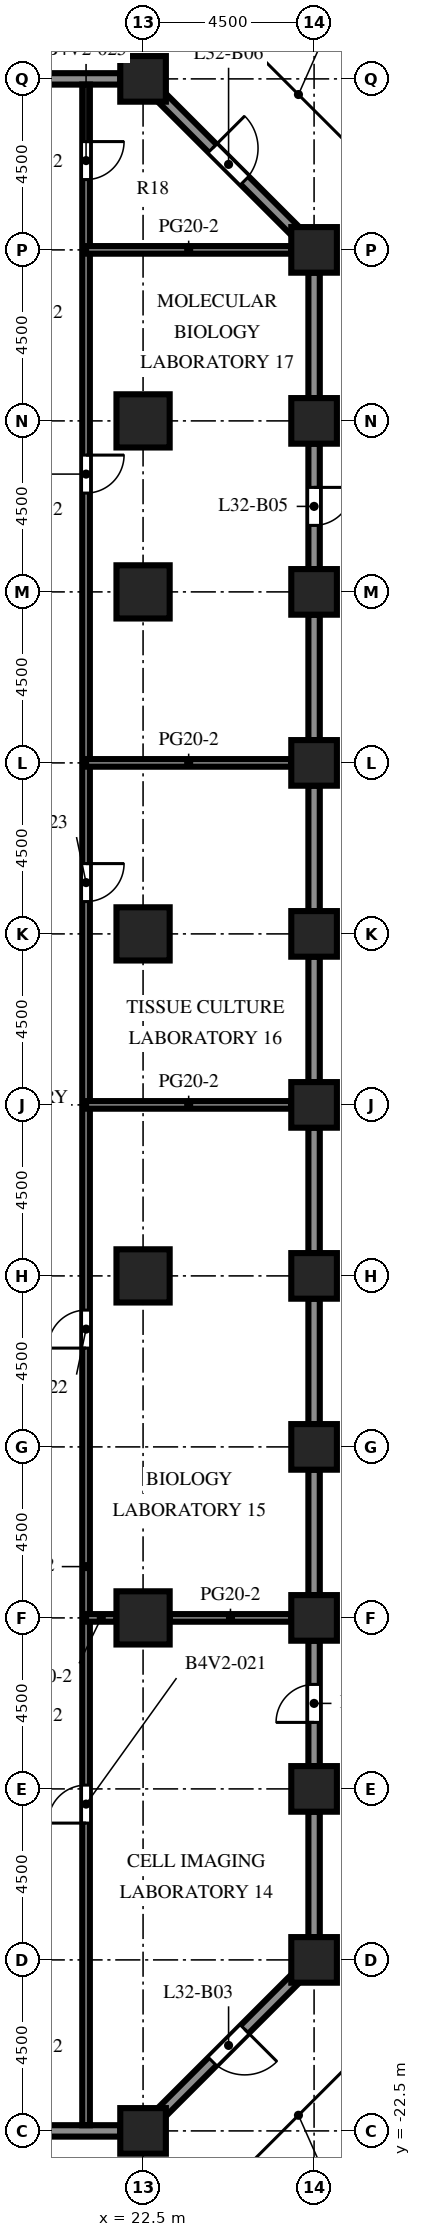
"""IFC4 building model, lengths in metres.
Left out: names, types, materials, properties, quantities, classifications, styles, units other than length and angle.
Written with IfcOpenShell. Run it as: python <this file> out.ifc"""

import sys

from ifc_helpers import new_model, si_unit, direction, frame, frame_2d, origin, origin_2d, place, context, subcontext, project, spatial, rectangle, extrude, element, fill, save


model = new_model("IFC4")
c1 = context("Model", 3, precision=1e-05, world=origin(), true_north=direction((0.0, 1.0)))
c2 = subcontext(c1, "Body", "Model", "MODEL_VIEW")
j1 = project(units=[si_unit("LENGTHUNIT", "METRE"), si_unit("PLANEANGLEUNIT", "RADIAN")], contexts=[c1])
p1 = place(None, origin())
s1 = spatial("IfcSite", under=j1, at=p1, CompositionType="ELEMENT")
p2 = place(p1, origin())
s2 = spatial("IfcBuilding", under=s1, at=p2, CompositionType="ELEMENT")
p3 = place(p2, frame((0.0, 0.0, 141.3)))
s3 = spatial("IfcBuildingStorey", under=s2, at=p3, CompositionType="ELEMENT", Elevation=141.3)
for number, where, z_axis, x_axis in (
    (1, (22.5, -22.5, 0.0), (0.0, 0.0, 1.0), (1.0, 0.0, 0.0)),
    (2, (22.5, 31.5, 0.0), (0.0, 0.0, 1.0), (1.0, 0.0, 0.0)),
    (3, (27.0, -18.0, 0.0), (0.0, 0.0, 1.0), (1.0, 0.0, 0.0)),
    (4, (27.0, -13.5, 0.0), (0.0, 0.0, 1.0), (1.0, 0.0, 0.0)),
    (5, (27.0, -9.0, 0.0), (0.0, 0.0, 1.0), (1.0, 0.0, 0.0)),
    (6, (27.0, -4.5, 0.0), (0.0, 0.0, 1.0), (1.0, 0.0, 0.0)),
    (7, (27.0, 0.0, 0.0), (0.0, 0.0, 1.0), (1.0, 0.0, 0.0)),
    (8, (27.0, 4.5, 0.0), (0.0, 0.0, 1.0), (1.0, 0.0, 0.0)),
    (9, (27.0, 9.0, 0.0), (0.0, 0.0, 1.0), (1.0, 0.0, 0.0)),
    (10, (27.0, 13.5, 0.0), (0.0, 0.0, 1.0), (1.0, 0.0, 0.0)),
    (11, (27.0, 18.0, 0.0), (0.0, 0.0, 1.0), (1.0, 0.0, 0.0)),
    (12, (27.0, 22.5, 0.0), (0.0, 0.0, 1.0), (1.0, 0.0, 0.0)),
    (13, (27.0, 27.0, 0.0), (0.0, 0.0, 1.0), (1.0, 0.0, 0.0)),
):
    element("IfcColumn", number, at=place(p3, frame(where, z_axis=z_axis, x_axis=x_axis)), inside=s3, PredefinedType="COLUMN", context=c2, shape_type="SweptSolid", body=[
        extrude(rectangle(XDim=1.2, YDim=1.2, at=origin_2d()), origin(), (0.0, 0.0, 1.0), 4.1),
    ])
for number, where, z_axis, x_axis in (
    (14, (22.5, -9.0, 0.0), (0.0, 0.0, 1.0), (1.0, 0.0, 0.0)),
    (15, (22.5, 0.0, 0.0), (0.0, 0.0, 1.0), (1.0, 0.0, 0.0)),
    (16, (22.5, 9.0, 0.0), (0.0, 0.0, 1.0), (1.0, 0.0, 0.0)),
    (17, (22.5, 18.0, 0.0), (0.0, 0.0, 1.0), (1.0, 0.0, 0.0)),
    (18, (22.5, 22.5, 0.0), (0.0, 0.0, 1.0), (1.0, 0.0, 0.0)),
):
    element("IfcColumn", number, at=place(p3, frame(where, z_axis=z_axis, x_axis=x_axis)), inside=s3, PredefinedType="COLUMN", context=c2, shape_type="SweptSolid", body=[
        extrude(rectangle(XDim=1.4, YDim=1.4, at=origin_2d()), origin(), (0.0, 0.0, 1.0), 4.1),
    ])
p4 = place(p3, frame((21.9, -22.5, 0.0), z_axis=(0.0, 0.0, 1.0), x_axis=(-1.0, 0.0, 0.0)))
e19 = element("IfcWall", 19, at=p4, inside=s3, PredefinedType="SOLIDWALL", context=c2, shape_type="SweptSolid", body=[
    extrude(rectangle(XDim=3.3, YDim=0.3, at=frame_2d((1.65, 0.0))), origin(), (0.0, 0.0, 1.0), 2.6),
])
p5 = place(p3, frame((26.506, -18.494, 0.0), z_axis=(0.0, 0.0, 1.0), x_axis=(-0.707106781187, -0.707106781187, 0.0)))
e20 = element("IfcWall", 20, at=p5, inside=s3, PredefinedType="SOLIDWALL", context=c2, shape_type="SweptSolid", body=[
    extrude(rectangle(XDim=4.967, YDim=0.3, at=frame_2d((2.483, 0.0))), origin(), (0.0, 0.0, 1.0), 2.6),
])
p6 = place(p5, frame((1.884, 0.0, 0.0)))
e21 = element("IfcOpeningElement", 21, at=p6, cuts=e20, PredefinedType="OPENING", context=c2, shape_type="SweptSolid", body=[
    extrude(rectangle(XDim=1.2, YDim=2.2, at=frame_2d((0.6, 1.1))), frame((0.0, 0.16, 0.0), z_axis=(0.0, -1.0, 0.0), x_axis=(1.0, 0.0, 0.0)), (0.0, 0.0, 1.0), 0.32),
])
p7 = place(p3, frame((27.0, -14.1, 0.0), z_axis=(0.0, 0.0, 1.0), x_axis=(0.0, -1.0, 0.0)))
e22 = element("IfcWall", 22, at=p7, inside=s3, PredefinedType="SOLIDWALL", context=c2, shape_type="SweptSolid", body=[
    extrude(rectangle(XDim=3.3, YDim=0.3, at=frame_2d((1.65, 0.0))), origin(), (0.0, 0.0, 1.0), 2.6),
])
p8 = place(p3, frame((27.0, -9.6, 0.0), z_axis=(0.0, 0.0, 1.0), x_axis=(0.0, -1.0, 0.0)))
e23 = element("IfcWall", 23, at=p8, inside=s3, PredefinedType="SOLIDWALL", context=c2, shape_type="SweptSolid", body=[
    extrude(rectangle(XDim=3.3, YDim=0.3, at=frame_2d((1.65, 0.0))), origin(), (0.0, 0.0, 1.0), 2.6),
])
p9 = place(p8, frame((1.15, 0.0, 0.0)))
e24 = element("IfcOpeningElement", 24, at=p9, cuts=e23, PredefinedType="OPENING", context=c2, shape_type="SweptSolid", body=[
    extrude(rectangle(XDim=1.0, YDim=2.2, at=frame_2d((0.5, 1.1))), frame((0.0, 0.16, 0.0), z_axis=(0.0, -1.0, 0.0), x_axis=(1.0, 0.0, 0.0)), (0.0, 0.0, 1.0), 0.32),
])
for number, where, z_axis, x_axis in (
    (25, (27.0, -5.1, 0.0), (0.0, 0.0, 1.0), (0.0, -1.0, 0.0)),
    (26, (27.0, -0.6, 0.0), (0.0, 0.0, 1.0), (0.0, -1.0, 0.0)),
    (27, (27.0, 3.9, 0.0), (0.0, 0.0, 1.0), (0.0, -1.0, 0.0)),
    (28, (27.0, 8.4, 0.0), (0.0, 0.0, 1.0), (0.0, -1.0, 0.0)),
    (29, (27.0, 12.9, 0.0), (0.0, 0.0, 1.0), (0.0, -1.0, 0.0)),
    (30, (27.0, 17.4, 0.0), (0.0, 0.0, 1.0), (0.0, -1.0, 0.0)),
):
    element("IfcWall", number, at=place(p3, frame(where, z_axis=z_axis, x_axis=x_axis)), inside=s3, PredefinedType="SOLIDWALL", context=c2, shape_type="SweptSolid", body=[
        extrude(rectangle(XDim=3.3, YDim=0.3, at=frame_2d((1.65, 0.0))), origin(), (0.0, 0.0, 1.0), 2.6),
    ])
p10 = place(p3, frame((27.0, 21.9, 0.0), z_axis=(0.0, 0.0, 1.0), x_axis=(0.0, -1.0, 0.0)))
e31 = element("IfcWall", 31, at=p10, inside=s3, PredefinedType="SOLIDWALL", context=c2, shape_type="SweptSolid", body=[
    extrude(rectangle(XDim=3.3, YDim=0.3, at=frame_2d((1.65, 0.0))), origin(), (0.0, 0.0, 1.0), 2.6),
])
p11 = place(p10, frame((1.15, 0.0, 0.0)))
e32 = element("IfcOpeningElement", 32, at=p11, cuts=e31, PredefinedType="OPENING", context=c2, shape_type="SweptSolid", body=[
    extrude(rectangle(XDim=1.0, YDim=2.2, at=frame_2d((0.5, 1.1))), frame((0.0, 0.16, 0.0), z_axis=(0.0, -1.0, 0.0), x_axis=(1.0, 0.0, 0.0)), (0.0, 0.0, 1.0), 0.32),
])
p12 = place(p3, frame((27.0, 26.4, 0.0), z_axis=(0.0, 0.0, 1.0), x_axis=(0.0, -1.0, 0.0)))
e33 = element("IfcWall", 33, at=p12, inside=s3, PredefinedType="SOLIDWALL", context=c2, shape_type="SweptSolid", body=[
    extrude(rectangle(XDim=3.3, YDim=0.3, at=frame_2d((1.65, 0.0))), origin(), (0.0, 0.0, 1.0), 2.6),
])
p13 = place(p3, frame((22.994, 31.006, 0.0), z_axis=(0.0, 0.0, 1.0), x_axis=(0.707106781187, -0.707106781187, 0.0)))
e34 = element("IfcWall", 34, at=p13, inside=s3, PredefinedType="SOLIDWALL", context=c2, shape_type="SweptSolid", body=[
    extrude(rectangle(XDim=4.967, YDim=0.3, at=frame_2d((2.483, 0.0))), origin(), (0.0, 0.0, 1.0), 2.6),
])
p14 = place(p13, frame((1.884, 0.0, 0.0)))
e35 = element("IfcOpeningElement", 35, at=p14, cuts=e34, PredefinedType="OPENING", context=c2, shape_type="SweptSolid", body=[
    extrude(rectangle(XDim=1.2, YDim=2.2, at=frame_2d((0.6, 1.1))), frame((0.0, 0.16, 0.0), z_axis=(0.0, -1.0, 0.0), x_axis=(1.0, 0.0, 0.0)), (0.0, 0.0, 1.0), 0.32),
])
p15 = place(p3, frame((18.6, 31.5, 0.0), z_axis=(0.0, 0.0, 1.0), x_axis=(1.0, 0.0, 0.0)))
e36 = element("IfcWall", 36, at=p15, inside=s3, PredefinedType="SOLIDWALL", context=c2, shape_type="SweptSolid", body=[
    extrude(rectangle(XDim=3.3, YDim=0.3, at=frame_2d((1.65, 0.0))), origin(), (0.0, 0.0, 1.0), 2.6),
])
p16 = place(p3, frame((21.0, 31.35, 0.0), z_axis=(0.0, 0.0, 1.0), x_axis=(0.0, -1.0, 0.0)))
e37 = element("IfcWall", 37, at=p16, inside=s3, PredefinedType="PARTITIONING", context=c2, shape_type="SweptSolid", body=[
    extrude(rectangle(XDim=53.7, YDim=0.2, at=frame_2d((26.85, 0.0))), origin(), (0.0, 0.0, 1.0), 3.5),
])
p17 = place(p16, frame((44.75, 0.0, 0.0)))
e38 = element("IfcOpeningElement", 38, at=p17, cuts=e37, PredefinedType="OPENING", context=c2, shape_type="SweptSolid", body=[
    extrude(rectangle(XDim=1.0, YDim=2.1, at=frame_2d((0.5, 1.05))), frame((0.0, 0.11, 0.0), z_axis=(0.0, -1.0, 0.0), x_axis=(1.0, 0.0, 0.0)), (0.0, 0.0, 1.0), 0.22),
])
p18 = place(p16, frame((32.25, 0.0, 0.0)))
e39 = element("IfcOpeningElement", 39, at=p18, cuts=e37, PredefinedType="OPENING", context=c2, shape_type="SweptSolid", body=[
    extrude(rectangle(XDim=1.0, YDim=2.1, at=frame_2d((0.5, 1.05))), frame((0.0, 0.11, 0.0), z_axis=(0.0, -1.0, 0.0), x_axis=(1.0, 0.0, 0.0)), (0.0, 0.0, 1.0), 0.22),
])
p19 = place(p16, frame((20.5, 0.0, 0.0)))
e40 = element("IfcOpeningElement", 40, at=p19, cuts=e37, PredefinedType="OPENING", context=c2, shape_type="SweptSolid", body=[
    extrude(rectangle(XDim=1.0, YDim=2.1, at=frame_2d((0.5, 1.05))), frame((0.0, 0.11, 0.0), z_axis=(0.0, -1.0, 0.0), x_axis=(1.0, 0.0, 0.0)), (0.0, 0.0, 1.0), 0.22),
])
p20 = place(p16, frame((9.75, 0.0, 0.0)))
e41 = element("IfcOpeningElement", 41, at=p20, cuts=e37, PredefinedType="OPENING", context=c2, shape_type="SweptSolid", body=[
    extrude(rectangle(XDim=1.0, YDim=2.1, at=frame_2d((0.5, 1.05))), frame((0.0, 0.11, 0.0), z_axis=(0.0, -1.0, 0.0), x_axis=(1.0, 0.0, 0.0)), (0.0, 0.0, 1.0), 0.22),
])
p21 = place(p16, frame((1.5, 0.0, 0.0)))
e42 = element("IfcOpeningElement", 42, at=p21, cuts=e37, PredefinedType="OPENING", context=c2, shape_type="SweptSolid", body=[
    extrude(rectangle(XDim=1.0, YDim=2.1, at=frame_2d((0.5, 1.05))), frame((0.0, 0.11, 0.0), z_axis=(0.0, -1.0, 0.0), x_axis=(1.0, 0.0, 0.0)), (0.0, 0.0, 1.0), 0.22),
])
p22 = place(p3, frame((21.0, -9.0, 0.0), z_axis=(0.0, 0.0, 1.0), x_axis=(1.0, 0.0, 0.0)))
e43 = element("IfcWall", 43, at=p22, inside=s3, PredefinedType="PARTITIONING", context=c2, shape_type="SweptSolid", body=[
    extrude(rectangle(XDim=0.8, YDim=0.2, at=frame_2d((0.4, 0.0))), origin(), (0.0, 0.0, 1.0), 3.5),
])
p23 = place(p3, frame((23.2, -9.0, 0.0), z_axis=(0.0, 0.0, 1.0), x_axis=(1.0, 0.0, 0.0)))
e44 = element("IfcWall", 44, at=p23, inside=s3, PredefinedType="PARTITIONING", context=c2, shape_type="SweptSolid", body=[
    extrude(rectangle(XDim=3.2, YDim=0.2, at=frame_2d((1.6, 0.0))), origin(), (0.0, 0.0, 1.0), 3.5),
])
for number, where, z_axis, x_axis in (
    (45, (21.0, 4.5, 0.0), (0.0, 0.0, 1.0), (1.0, 0.0, 0.0)),
    (46, (21.0, 13.5, 0.0), (0.0, 0.0, 1.0), (1.0, 0.0, 0.0)),
    (47, (21.0, 27.0, 0.0), (0.0, 0.0, 1.0), (1.0, 0.0, 0.0)),
):
    element("IfcWall", number, at=place(p3, frame(where, z_axis=z_axis, x_axis=x_axis)), inside=s3, PredefinedType="PARTITIONING", context=c2, shape_type="SweptSolid", body=[
        extrude(rectangle(XDim=5.4, YDim=0.2, at=frame_2d((2.7, 0.0))), origin(), (0.0, 0.0, 1.0), 3.5),
    ])
p24 = place(p6, origin())
e48 = element("IfcDoor", 48, at=p24, inside=s3, OperationType="SINGLE_SWING_LEFT", PredefinedType="DOOR", context=c2, shape_type="SweptSolid", body=[
    extrude(rectangle(XDim=1.2, YDim=2.2, at=frame_2d((0.6, 1.1))), frame((0.0, 0.025, 0.0), z_axis=(0.0, -1.0, 0.0), x_axis=(1.0, 0.0, 0.0)), (0.0, 0.0, 1.0), 0.05),
])
fill(e21, e48)
p25 = place(p9, origin())
e49 = element("IfcDoor", 49, at=p25, inside=s3, OperationType="SINGLE_SWING_RIGHT", PredefinedType="DOOR", context=c2, shape_type="SweptSolid", body=[
    extrude(rectangle(XDim=1.0, YDim=2.2, at=frame_2d((0.5, 1.1))), frame((0.0, 0.025, 0.0), z_axis=(0.0, -1.0, 0.0), x_axis=(1.0, 0.0, 0.0)), (0.0, 0.0, 1.0), 0.05),
])
fill(e24, e49)
p26 = place(p11, origin())
e50 = element("IfcDoor", 50, at=p26, inside=s3, OperationType="SINGLE_SWING_LEFT", PredefinedType="DOOR", context=c2, shape_type="SweptSolid", body=[
    extrude(rectangle(XDim=1.0, YDim=2.2, at=frame_2d((0.5, 1.1))), frame((0.0, 0.025, 0.0), z_axis=(0.0, -1.0, 0.0), x_axis=(1.0, 0.0, 0.0)), (0.0, 0.0, 1.0), 0.05),
])
fill(e32, e50)
p27 = place(p14, origin())
e51 = element("IfcDoor", 51, at=p27, inside=s3, OperationType="SINGLE_SWING_LEFT", PredefinedType="DOOR", context=c2, shape_type="SweptSolid", body=[
    extrude(rectangle(XDim=1.2, YDim=2.2, at=frame_2d((0.6, 1.1))), frame((0.0, 0.025, 0.0), z_axis=(0.0, -1.0, 0.0), x_axis=(1.0, 0.0, 0.0)), (0.0, 0.0, 1.0), 0.05),
])
fill(e35, e51)
p28 = place(p17, origin())
e52 = element("IfcDoor", 52, at=p28, inside=s3, OperationType="SINGLE_SWING_RIGHT", PredefinedType="DOOR", context=c2, shape_type="SweptSolid", body=[
    extrude(rectangle(XDim=1.0, YDim=2.1, at=frame_2d((0.5, 1.05))), frame((0.0, 0.025, 0.0), z_axis=(0.0, -1.0, 0.0), x_axis=(1.0, 0.0, 0.0)), (0.0, 0.0, 1.0), 0.05),
])
fill(e38, e52)
p29 = place(p18, origin())
e53 = element("IfcDoor", 53, at=p29, inside=s3, OperationType="SINGLE_SWING_RIGHT", PredefinedType="DOOR", context=c2, shape_type="SweptSolid", body=[
    extrude(rectangle(XDim=1.0, YDim=2.1, at=frame_2d((0.5, 1.05))), frame((0.0, 0.025, 0.0), z_axis=(0.0, -1.0, 0.0), x_axis=(1.0, 0.0, 0.0)), (0.0, 0.0, 1.0), 0.05),
])
fill(e39, e53)
p30 = place(p19, origin())
e54 = element("IfcDoor", 54, at=p30, inside=s3, OperationType="SINGLE_SWING_LEFT", PredefinedType="DOOR", context=c2, shape_type="SweptSolid", body=[
    extrude(rectangle(XDim=1.0, YDim=2.1, at=frame_2d((0.5, 1.05))), frame((0.0, 0.025, 0.0), z_axis=(0.0, -1.0, 0.0), x_axis=(1.0, 0.0, 0.0)), (0.0, 0.0, 1.0), 0.05),
])
fill(e40, e54)
p31 = place(p20, origin())
e55 = element("IfcDoor", 55, at=p31, inside=s3, OperationType="SINGLE_SWING_LEFT", PredefinedType="DOOR", context=c2, shape_type="SweptSolid", body=[
    extrude(rectangle(XDim=1.0, YDim=2.1, at=frame_2d((0.5, 1.05))), frame((0.0, 0.025, 0.0), z_axis=(0.0, -1.0, 0.0), x_axis=(1.0, 0.0, 0.0)), (0.0, 0.0, 1.0), 0.05),
])
fill(e41, e55)
p32 = place(p21, origin())
e56 = element("IfcDoor", 56, at=p32, inside=s3, OperationType="SINGLE_SWING_LEFT", PredefinedType="DOOR", context=c2, shape_type="SweptSolid", body=[
    extrude(rectangle(XDim=1.0, YDim=2.1, at=frame_2d((0.5, 1.05))), frame((0.0, 0.025, 0.0), z_axis=(0.0, -1.0, 0.0), x_axis=(1.0, 0.0, 0.0)), (0.0, 0.0, 1.0), 0.05),
])
fill(e42, e56)
save(model, sys.argv[1])
